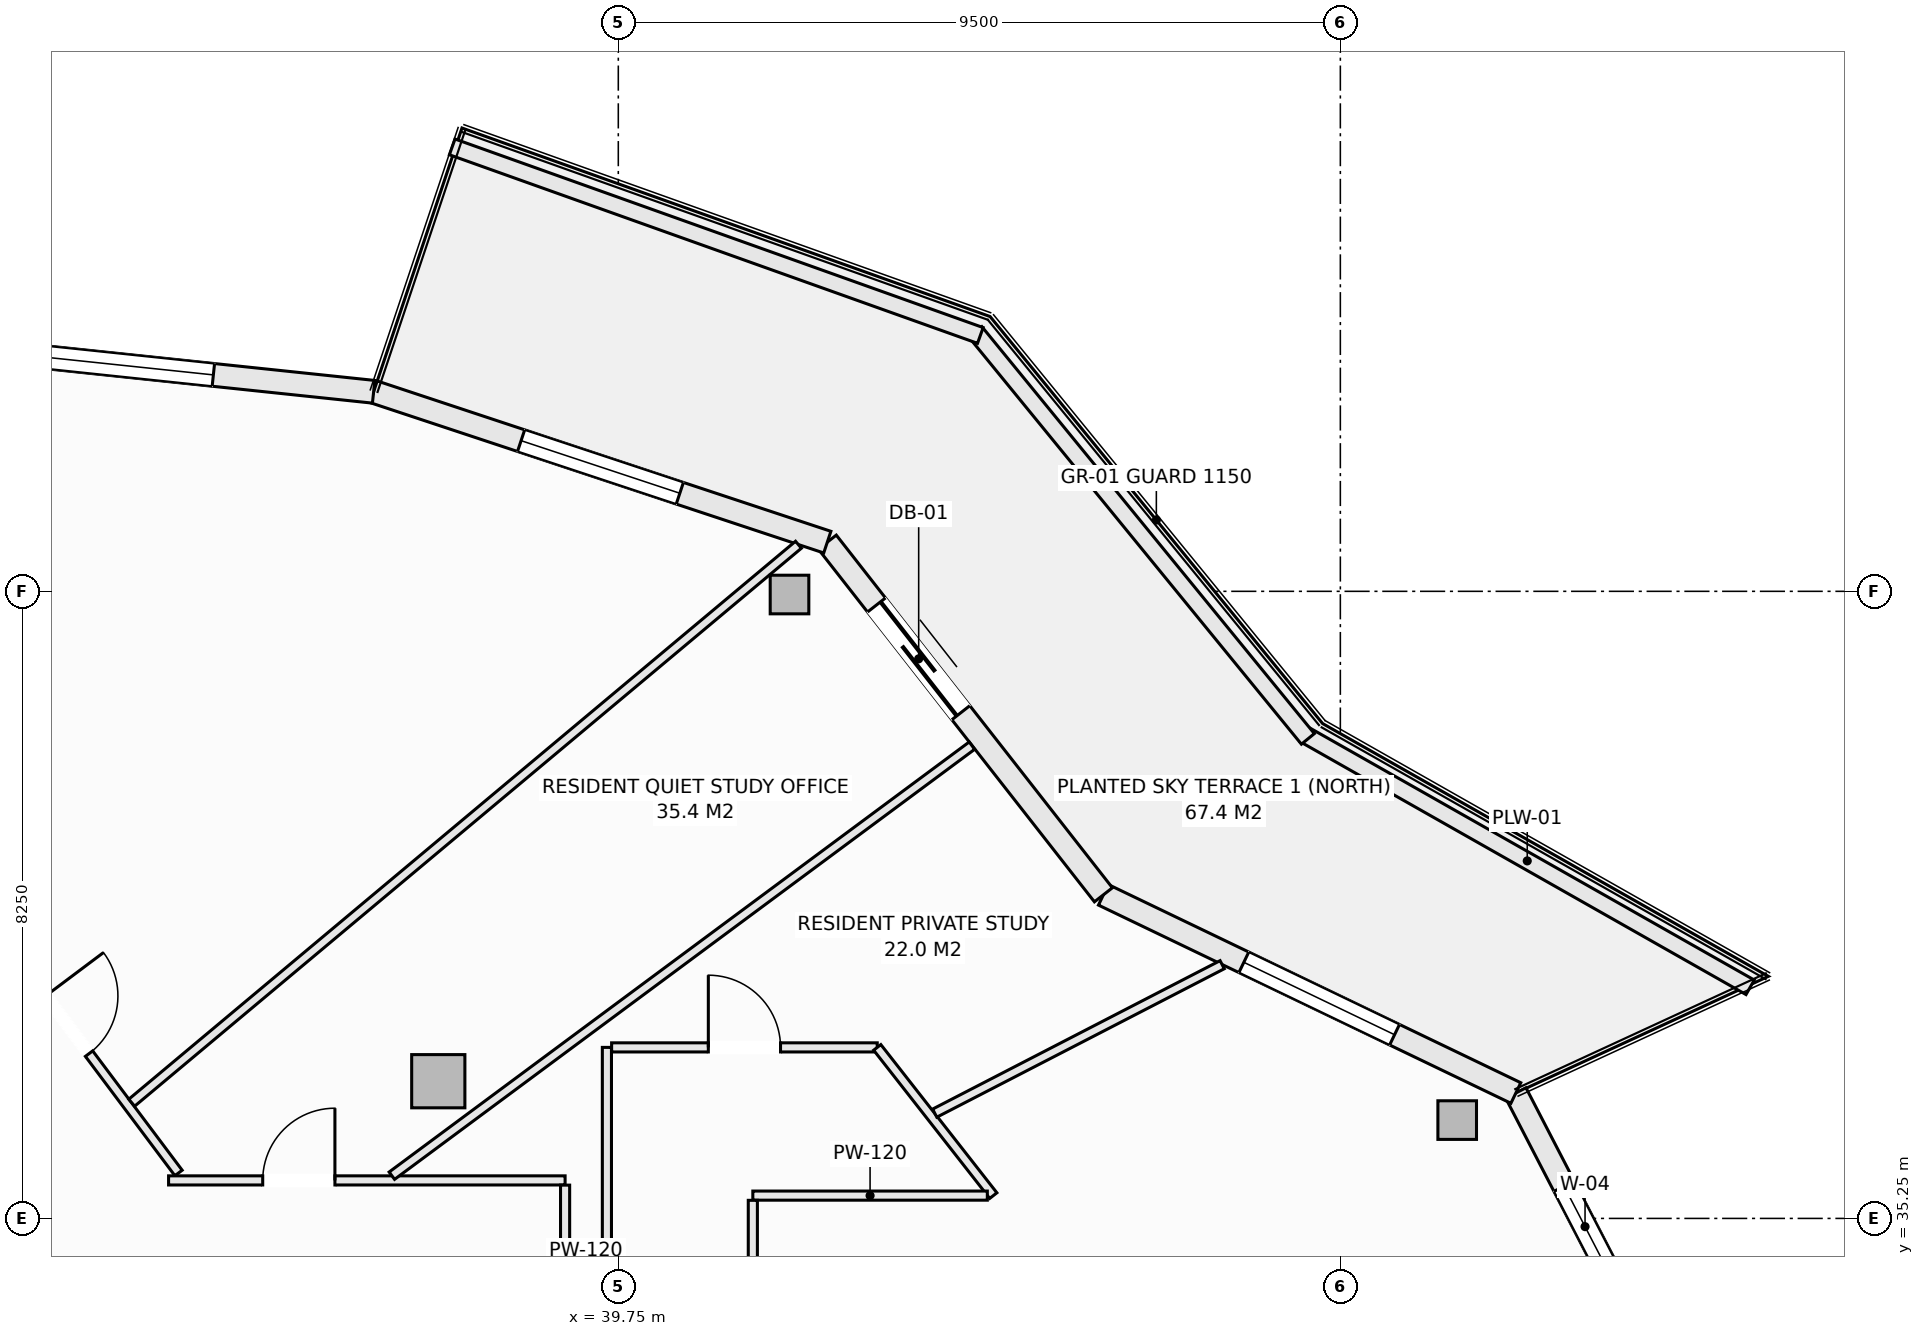
"""IFC4 building model, lengths in metres.
Left out: names, types, materials, properties, quantities, classifications, styles, units other than length and angle.
Written with IfcOpenShell. Run it as: python <this file> out.ifc"""

import sys

from ifc_helpers import new_model, si_unit, direction, frame, frame_2d, origin, origin_2d, place, context, subcontext, project, spatial, rectangle, hollow_rectangle, extrude, element, fill, save


model = new_model("IFC4")
c1 = context("Model", 3, precision=1e-05, world=origin(), true_north=direction((0.0, 1.0)))
c2 = subcontext(c1, "Body", "Model", "MODEL_VIEW")
j1 = project(units=[si_unit("LENGTHUNIT", "METRE"), si_unit("PLANEANGLEUNIT", "RADIAN")], contexts=[c1])
p1 = place(None, origin())
s1 = spatial("IfcSite", under=j1, at=p1, CompositionType="ELEMENT")
p2 = place(p1, origin())
s2 = spatial("IfcBuilding", under=s1, at=p2, CompositionType="ELEMENT")
p3 = place(p2, frame((0.0, 0.0, 216.2)))
s3 = spatial("IfcBuildingStorey", under=s2, at=p3, CompositionType="ELEMENT", Elevation=216.2)
for number, where, z_axis, x_axis in (
    (1, (50.787, 36.544, -0.27), (0.0, 0.0, 1.0), (1.0, 0.0, 0.0)),
    (2, (42.003, 43.458, -0.27), (0.0, 0.0, 1.0), (1.0, 0.0, 0.0)),
):
    element("IfcColumn", number, at=place(p3, frame(where, z_axis=z_axis, x_axis=x_axis)), inside=s3, PredefinedType="COLUMN", context=c2, shape_type="SweptSolid", body=[
        extrude(hollow_rectangle(XDim=0.508, YDim=0.508, WallThickness=0.019, at=origin_2d()), origin(), (0.0, 0.0, 1.0), 3.3),
    ])
p4 = place(p3, frame((37.382, 37.055, -0.27), z_axis=(0.0, 0.0, 1.0), x_axis=(1.0, 0.0, 0.0)))
e3 = element("IfcColumn", 3, at=p4, inside=s3, PredefinedType="COLUMN", context=c2, shape_type="SweptSolid", body=[
    extrude(rectangle(XDim=0.7, YDim=0.7, at=origin_2d()), origin(), (0.0, 0.0, 1.0), 3.3),
])
p5 = place(p3, frame((51.559, 36.9, 0.0), z_axis=(0.0, 0.0, 1.0), x_axis=(0.459808219482, -0.888018243786, 0.0)))
e4 = element("IfcWall", 4, at=p5, inside=s3, PredefinedType="SOLIDWALL", context=c2, shape_type="SweptSolid", body=[
    extrude(rectangle(XDim=5.378, YDim=0.3, at=frame_2d((2.689, 0.0))), origin(), (0.0, 0.0, 1.0), 2.605),
])
p6 = place(p5, frame((1.38, 0.0, 0.72)))
e5 = element("IfcOpeningElement", 5, at=p6, cuts=e4, PredefinedType="OPENING", context=c2, shape_type="SweptSolid", body=[
    extrude(rectangle(XDim=1.2, YDim=1.65, at=frame_2d((0.6, 0.825))), frame((0.0, 0.16, 0.0), z_axis=(0.0, -1.0, 0.0), x_axis=(1.0, 0.0, 0.0)), (0.0, 0.0, 1.0), 0.32),
])
p7 = place(p3, frame((46.133, 39.507, 0.0), z_axis=(0.0, 0.0, 1.0), x_axis=(0.901348331142, -0.433094892545, 0.0)))
e6 = element("IfcWall", 6, at=p7, inside=s3, PredefinedType="SOLIDWALL", context=c2, shape_type="SweptSolid", body=[
    extrude(rectangle(XDim=6.021, YDim=0.3, at=frame_2d((3.01, 0.0))), origin(), (0.0, 0.0, 1.0), 2.605),
])
p8 = place(p7, frame((2.05, 0.0, 0.72)))
e7 = element("IfcOpeningElement", 7, at=p8, cuts=e6, PredefinedType="OPENING", context=c2, shape_type="SweptSolid", body=[
    extrude(rectangle(XDim=2.2, YDim=1.65, at=frame_2d((1.1, 0.825))), frame((0.0, 0.16, 0.0), z_axis=(0.0, -1.0, 0.0), x_axis=(1.0, 0.0, 0.0)), (0.0, 0.0, 1.0), 0.32),
])
p9 = place(p3, frame((42.5, 44.147, 0.0), z_axis=(0.0, 0.0, 1.0), x_axis=(0.616450126935, -0.787393955401, 0.0)))
e8 = element("IfcWall", 8, at=p9, inside=s3, PredefinedType="SOLIDWALL", context=c2, shape_type="SweptSolid", body=[
    extrude(rectangle(XDim=5.893, YDim=0.3, at=frame_2d((2.946, 0.0))), origin(), (0.0, 0.0, 1.0), 2.605),
])
p10 = place(p9, frame((1.05, 0.0, 0.0)))
e9 = element("IfcOpeningElement", 9, at=p10, cuts=e8, PredefinedType="OPENING", context=c2, shape_type="SweptSolid", body=[
    extrude(rectangle(XDim=1.8, YDim=2.25, at=frame_2d((0.9, 1.125))), frame((0.0, 0.16, 0.0), z_axis=(0.0, -1.0, 0.0), x_axis=(1.0, 0.0, 0.0)), (0.0, 0.0, 1.0), 0.32),
])
p11 = place(p3, frame((36.531, 46.125, 0.0), z_axis=(0.0, 0.0, 1.0), x_axis=(0.949240877604, -0.314550085495, 0.0)))
e10 = element("IfcWall", 10, at=p11, inside=s3, PredefinedType="SOLIDWALL", context=c2, shape_type="SweptSolid", body=[
    extrude(rectangle(XDim=6.288, YDim=0.3, at=frame_2d((3.144, 0.0))), origin(), (0.0, 0.0, 1.0), 2.605),
])
p12 = place(p11, frame((2.044, 0.0, 0.72)))
e11 = element("IfcOpeningElement", 11, at=p12, cuts=e10, PredefinedType="OPENING", context=c2, shape_type="SweptSolid", body=[
    extrude(rectangle(XDim=2.2, YDim=1.65, at=frame_2d((1.1, 0.825))), frame((0.0, 0.16, 0.0), z_axis=(0.0, -1.0, 0.0), x_axis=(1.0, 0.0, 0.0)), (0.0, 0.0, 1.0), 0.32),
])
p13 = place(p3, frame((30.125, 46.8, 0.0), z_axis=(0.0, 0.0, 1.0), x_axis=(0.994497142298, -0.104763705363, 0.0)))
e12 = element("IfcWall", 12, at=p13, inside=s3, PredefinedType="SOLIDWALL", context=c2, shape_type="SweptSolid", body=[
    extrude(rectangle(XDim=6.441, YDim=0.3, at=frame_2d((3.221, 0.0))), origin(), (0.0, 0.0, 1.0), 2.605),
])
p14 = place(p13, frame((2.121, 0.0, 0.72)))
e13 = element("IfcOpeningElement", 13, at=p14, cuts=e12, PredefinedType="OPENING", context=c2, shape_type="SweptSolid", body=[
    extrude(rectangle(XDim=2.2, YDim=1.65, at=frame_2d((1.1, 0.825))), frame((0.0, 0.16, 0.0), z_axis=(0.0, -1.0, 0.0), x_axis=(1.0, 0.0, 0.0)), (0.0, 0.0, 1.0), 0.32),
])
p15 = place(p3, frame((48.776, 41.617, 0.0), z_axis=(0.0, 0.0, 1.0), x_axis=(0.869860619267, -0.493297580623, 0.0)))
e14 = element("IfcWall", 14, at=p15, inside=s3, PredefinedType="PARAPET", context=c2, shape_type="SweptSolid", body=[
    extrude(rectangle(XDim=6.743, YDim=0.22, at=frame_2d((3.371, 0.0))), origin(), (0.0, 0.0, 1.0), 0.52),
])
p16 = place(p3, frame((44.448, 46.913, 0.0), z_axis=(0.0, 0.0, 1.0), x_axis=(0.632697312147, -0.774399193699, 0.0)))
e15 = element("IfcWall", 15, at=p16, inside=s3, PredefinedType="PARAPET", context=c2, shape_type="SweptSolid", body=[
    extrude(rectangle(XDim=6.914, YDim=0.22, at=frame_2d((3.457, 0.0))), origin(), (0.0, 0.0, 1.0), 0.52),
])
p17 = place(p3, frame((37.565, 49.347, 0.0), z_axis=(0.0, 0.0, 1.0), x_axis=(0.941780086523, -0.336229488042, 0.0)))
e16 = element("IfcWall", 16, at=p17, inside=s3, PredefinedType="PARAPET", context=c2, shape_type="SweptSolid", body=[
    extrude(rectangle(XDim=7.378, YDim=0.22, at=frame_2d((3.689, 0.0))), origin(), (0.0, 0.0, 1.0), 0.52),
])
p18 = place(p3, frame((31.456, 39.191, 0.0), z_axis=(0.0, 0.0, 1.0), x_axis=(0.600056078533, -0.799957938029, 0.0)))
e17 = element("IfcWall", 17, at=p18, inside=s3, PredefinedType="PARTITIONING", context=c2, shape_type="SweptSolid", body=[
    extrude(rectangle(XDim=4.179, YDim=0.12, at=frame_2d((2.09, 0.0))), origin(), (0.0, 0.0, 1.0), 2.478),
])
p19 = place(p18, frame((1.267, 0.0, 0.0)))
e18 = element("IfcOpeningElement", 18, at=p19, cuts=e17, PredefinedType="OPENING", context=c2, shape_type="SweptSolid", body=[
    extrude(rectangle(XDim=0.95, YDim=2.1, at=frame_2d((0.475, 1.05))), frame((0.0, 0.07, 0.0), z_axis=(0.0, -1.0, 0.0), x_axis=(1.0, 0.0, 0.0)), (0.0, 0.0, 1.0), 0.14),
])
p20 = place(p3, frame((33.833, 35.75, 0.0), z_axis=(0.0, 0.0, 1.0), x_axis=(1.0, 0.0, 0.0)))
e19 = element("IfcWall", 19, at=p20, inside=s3, PredefinedType="PARTITIONING", context=c2, shape_type="SweptSolid", body=[
    extrude(rectangle(XDim=5.217, YDim=0.12, at=frame_2d((2.608, 0.0))), origin(), (0.0, 0.0, 1.0), 2.478),
])
p21 = place(p20, frame((1.239, 0.0, 0.0)))
e20 = element("IfcOpeningElement", 20, at=p21, cuts=e19, PredefinedType="OPENING", context=c2, shape_type="SweptSolid", body=[
    extrude(rectangle(XDim=0.95, YDim=2.1, at=frame_2d((0.475, 1.05))), frame((0.0, 0.07, 0.0), z_axis=(0.0, -1.0, 0.0), x_axis=(1.0, 0.0, 0.0)), (0.0, 0.0, 1.0), 0.14),
])
p22 = place(p3, frame((39.05, 33.75, 0.0), z_axis=(0.0, 0.0, 1.0), x_axis=(0.0, 1.0, 0.0)))
e21 = element("IfcWall", 21, at=p22, inside=s3, PredefinedType="PARTITIONING", context=c2, shape_type="SweptSolid", body=[
    extrude(rectangle(XDim=1.938, YDim=0.12, at=frame_2d((0.969, 0.0))), origin(), (0.0, 0.0, 1.0), 3.03),
])
p23 = place(p3, frame((39.6, 31.197, 0.0), z_axis=(0.0, 0.0, 1.0), x_axis=(0.0, 1.0, 0.0)))
e22 = element("IfcWall", 22, at=p23, inside=s3, PredefinedType="PARTITIONING", context=c2, shape_type="SweptSolid", body=[
    extrude(rectangle(XDim=6.303, YDim=0.12, at=frame_2d((3.151, 0.0))), origin(), (0.0, 0.0, 1.0), 3.03),
])
p24 = place(p3, frame((39.662, 37.5, 0.0), z_axis=(0.0, 0.0, 1.0), x_axis=(1.0, 0.0, 0.0)))
e23 = element("IfcWall", 23, at=p24, inside=s3, PredefinedType="PARTITIONING", context=c2, shape_type="SweptSolid", body=[
    extrude(rectangle(XDim=3.495, YDim=0.12, at=frame_2d((1.748, 0.0))), origin(), (0.0, 0.0, 1.0), 2.77),
])
p25 = place(p24, frame((1.272, 0.0, 0.0)))
e24 = element("IfcOpeningElement", 24, at=p25, cuts=e23, PredefinedType="OPENING", context=c2, shape_type="SweptSolid", body=[
    extrude(rectangle(XDim=0.95, YDim=2.1, at=frame_2d((0.475, 1.05))), frame((0.0, 0.07, 0.0), z_axis=(0.0, -1.0, 0.0), x_axis=(1.0, 0.0, 0.0)), (0.0, 0.0, 1.0), 0.14),
])
p26 = place(p3, frame((43.157, 37.5, 0.0), z_axis=(0.0, 0.0, 1.0), x_axis=(0.616571357052, -0.78729902938, 0.0)))
e25 = element("IfcWall", 25, at=p26, inside=s3, PredefinedType="PARTITIONING", context=c2, shape_type="SweptSolid", body=[
    extrude(rectangle(XDim=2.477, YDim=0.12, at=frame_2d((1.238, 0.0))), origin(), (0.0, 0.0, 1.0), 3.03),
])
p27 = place(p3, frame((41.52, 35.55, 0.0), z_axis=(0.0, 0.0, 1.0), x_axis=(1.0, 0.0, 0.0)))
e26 = element("IfcWall", 26, at=p27, inside=s3, PredefinedType="PARTITIONING", context=c2, shape_type="SweptSolid", body=[
    extrude(rectangle(XDim=3.085, YDim=0.12, at=frame_2d((1.542, 0.0))), origin(), (0.0, 0.0, 1.0), 3.03),
])
p28 = place(p3, frame((41.52, 33.193, 0.0), z_axis=(0.0, 0.0, 1.0), x_axis=(0.0, 1.0, 0.0)))
e27 = element("IfcWall", 27, at=p28, inside=s3, PredefinedType="PARTITIONING", context=c2, shape_type="SweptSolid", body=[
    extrude(rectangle(XDim=2.295, YDim=0.12, at=frame_2d((1.147, 0.0))), origin(), (0.0, 0.0, 1.0), 3.03),
])
p29 = place(p3, frame((43.913, 36.635, 0.0), z_axis=(0.0, 0.0, 1.0), x_axis=(0.888547502497, 0.458784629, 0.0)))
e28 = element("IfcWall", 28, at=p29, inside=s3, PredefinedType="PARTITIONING", context=c2, shape_type="SweptSolid", body=[
    extrude(rectangle(XDim=4.257, YDim=0.12, at=frame_2d((2.128, 0.0))), origin(), (0.0, 0.0, 1.0), 3.03),
])
p30 = place(p3, frame((36.771, 35.812, 0.0), z_axis=(0.0, 0.0, 1.0), x_axis=(0.803336358715, 0.595525561807, 0.0)))
e29 = element("IfcWall", 29, at=p30, inside=s3, PredefinedType="PARTITIONING", context=c2, shape_type="SweptSolid", body=[
    extrude(rectangle(XDim=9.501, YDim=0.12, at=frame_2d((4.75, 0.0))), origin(), (0.0, 0.0, 1.0), 3.03),
])
p31 = place(p3, frame((33.348, 36.772, 0.0), z_axis=(0.0, 0.0, 1.0), x_axis=(0.766923298506, 0.641738774119, 0.0)))
e30 = element("IfcWall", 30, at=p31, inside=s3, PredefinedType="PARTITIONING", context=c2, shape_type="SweptSolid", body=[
    extrude(rectangle(XDim=11.438, YDim=0.12, at=frame_2d((5.719, 0.0))), origin(), (0.0, 0.0, 1.0), 3.03),
])
p32 = place(p6, origin())
e31 = element("IfcWindow", 31, at=p32, inside=s3, PartitioningType="SINGLE_PANEL", PredefinedType="WINDOW", context=c2, shape_type="SweptSolid", body=[
    extrude(rectangle(XDim=1.2, YDim=1.65, at=frame_2d((0.6, 0.825))), frame((0.0, 0.03, 0.0), z_axis=(0.0, -1.0, 0.0), x_axis=(1.0, 0.0, 0.0)), (0.0, 0.0, 1.0), 0.06),
])
fill(e5, e31)
p33 = place(p8, origin())
e32 = element("IfcWindow", 32, at=p33, inside=s3, PartitioningType="SINGLE_PANEL", PredefinedType="WINDOW", context=c2, shape_type="SweptSolid", body=[
    extrude(rectangle(XDim=2.2, YDim=1.65, at=frame_2d((1.1, 0.825))), frame((0.0, 0.03, 0.0), z_axis=(0.0, -1.0, 0.0), x_axis=(1.0, 0.0, 0.0)), (0.0, 0.0, 1.0), 0.06),
])
fill(e7, e32)
p34 = place(p10, origin())
e33 = element("IfcDoor", 33, at=p34, inside=s3, OperationType="SLIDING_TO_LEFT", PredefinedType="DOOR", context=c2, shape_type="SweptSolid", body=[
    extrude(rectangle(XDim=1.8, YDim=2.25, at=frame_2d((0.9, 1.125))), frame((0.0, 0.025, 0.0), z_axis=(0.0, -1.0, 0.0), x_axis=(1.0, 0.0, 0.0)), (0.0, 0.0, 1.0), 0.05),
])
fill(e9, e33)
p35 = place(p12, origin())
e34 = element("IfcWindow", 34, at=p35, inside=s3, PartitioningType="SINGLE_PANEL", PredefinedType="WINDOW", context=c2, shape_type="SweptSolid", body=[
    extrude(rectangle(XDim=2.2, YDim=1.65, at=frame_2d((1.1, 0.825))), frame((0.0, 0.03, 0.0), z_axis=(0.0, -1.0, 0.0), x_axis=(1.0, 0.0, 0.0)), (0.0, 0.0, 1.0), 0.06),
])
fill(e11, e34)
p36 = place(p14, origin())
e35 = element("IfcWindow", 35, at=p36, inside=s3, PartitioningType="SINGLE_PANEL", PredefinedType="WINDOW", context=c2, shape_type="SweptSolid", body=[
    extrude(rectangle(XDim=2.2, YDim=1.65, at=frame_2d((1.1, 0.825))), frame((0.0, 0.03, 0.0), z_axis=(0.0, -1.0, 0.0), x_axis=(1.0, 0.0, 0.0)), (0.0, 0.0, 1.0), 0.06),
])
fill(e13, e35)
p37 = place(p25, origin())
e36 = element("IfcDoor", 36, at=p37, inside=s3, OperationType="SINGLE_SWING_LEFT", PredefinedType="DOOR", context=c2, shape_type="SweptSolid", body=[
    extrude(rectangle(XDim=0.95, YDim=2.1, at=frame_2d((0.475, 1.05))), frame((0.0, 0.025, 0.0), z_axis=(0.0, -1.0, 0.0), x_axis=(1.0, 0.0, 0.0)), (0.0, 0.0, 1.0), 0.05),
])
fill(e24, e36)
p38 = place(p21, origin())
e37 = element("IfcDoor", 37, at=p38, inside=s3, OperationType="SINGLE_SWING_RIGHT", PredefinedType="DOOR", context=c2, shape_type="SweptSolid", body=[
    extrude(rectangle(XDim=0.95, YDim=2.1, at=frame_2d((0.475, 1.05))), frame((0.0, 0.025, 0.0), z_axis=(0.0, -1.0, 0.0), x_axis=(1.0, 0.0, 0.0)), (0.0, 0.0, 1.0), 0.05),
])
fill(e20, e37)
p39 = place(p19, origin())
e38 = element("IfcDoor", 38, at=p39, inside=s3, OperationType="SINGLE_SWING_LEFT", PredefinedType="DOOR", context=c2, shape_type="SweptSolid", body=[
    extrude(rectangle(XDim=0.95, YDim=2.1, at=frame_2d((0.475, 1.05))), frame((0.0, 0.025, 0.0), z_axis=(0.0, -1.0, 0.0), x_axis=(1.0, 0.0, 0.0)), (0.0, 0.0, 1.0), 0.05),
])
fill(e18, e38)
save(model, sys.argv[1])
